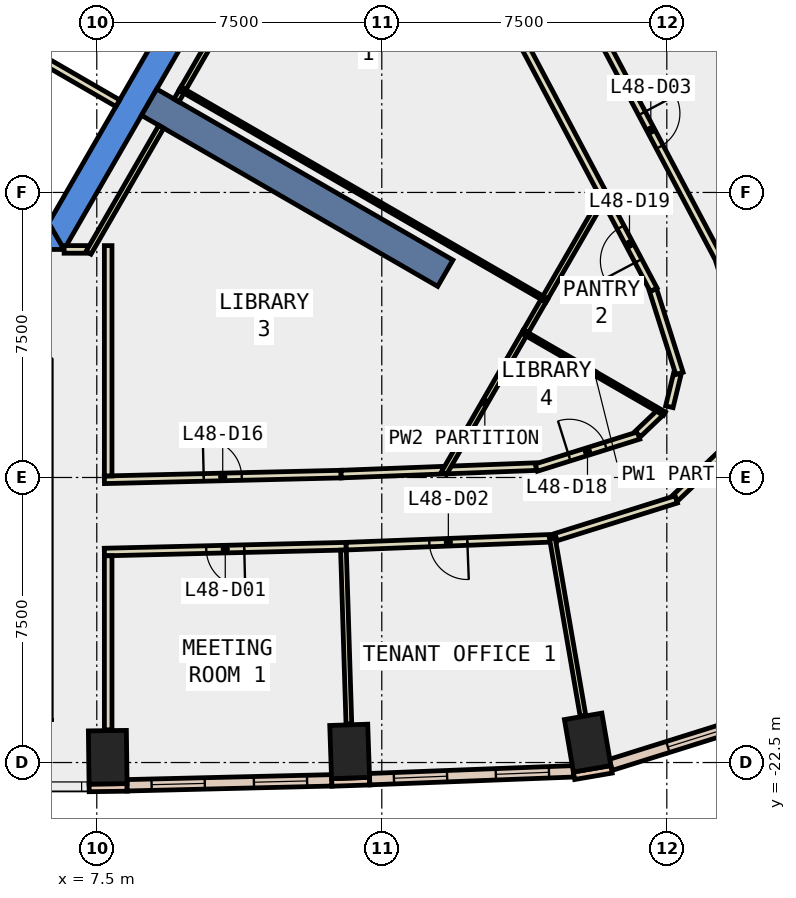
"""IFC4 building model, lengths in metres.
Left out: names, types, materials, properties, quantities, classifications, styles, units other than length and angle.
Written with IfcOpenShell. Run it as: python <this file> out.ifc"""

import sys

from ifc_helpers import new_model, si_unit, direction, frame, frame_2d, origin, origin_2d, place, context, subcontext, project, spatial, polyline, rectangle, outline, extrude, element, fill, save


model = new_model("IFC4")
c1 = context("Model", 3, precision=1e-05, world=origin(), true_north=direction((0.0, 1.0)))
c2 = subcontext(c1, "Body", "Model", "MODEL_VIEW")
j1 = project(units=[si_unit("LENGTHUNIT", "METRE"), si_unit("PLANEANGLEUNIT", "RADIAN")], contexts=[c1])
p1 = place(None, origin())
s1 = spatial("IfcSite", under=j1, at=p1, CompositionType="ELEMENT")
p2 = place(p1, origin())
s2 = spatial("IfcBuilding", under=s1, at=p2, CompositionType="ELEMENT")
p3 = place(p2, frame((0.0, 0.0, 215.0)))
s3 = spatial("IfcBuildingStorey", under=s2, at=p3, CompositionType="ELEMENT", Elevation=215.0)
for number, where, z_axis, x_axis in (
    (1, (7.788, -22.361, -0.4), (0.0, 0.0, 1.0), (1.0, 0.013, 0.0)),
    (2, (14.154, -22.208, -0.4), (0.0, 0.0, 1.0), (0.999, 0.034, 0.0)),
    (3, (20.417, -21.975, -0.4), (0.0, 0.0, 1.0), (0.986, 0.169, 0.0)),
):
    element("IfcColumn", number, at=place(p3, frame(where, z_axis=z_axis, x_axis=x_axis)), inside=s3, PredefinedType="COLUMN", context=c2, shape_type="SweptSolid", body=[
        extrude(rectangle(XDim=1.0, YDim=1.4, at=origin_2d()), origin(), (0.0, 0.0, 1.0), 4.2),
    ])
p4 = place(p3, frame((0.0, 0.0, -0.4)))
e4 = element("IfcWall", 4, at=p4, inside=s3, PredefinedType="SHEAR", context=c2, shape_type="SweptSolid", body=[
    extrude(outline(polyline([(5.75, -8.3), (5.75, -9.0), (6.64, -9.0), (6.235, -8.3), (5.75, -8.3)])), origin(), (0.0, 0.0, 1.0), 4.2),
])
p5 = place(p3, frame((0.0, 0.0, -0.4)))
e5 = element("IfcWall", 5, at=p5, inside=s3, PredefinedType="SHEAR", context=c2, shape_type="SweptSolid", body=[
    extrude(outline(polyline([(6.64, -9.0), (13.279, 2.5), (12.471, 2.5), (6.235, -8.3), (6.64, -9.0)])), origin(), (0.0, 0.0, 1.0), 4.2),
])
p6 = place(p3, frame((8.877, -5.125, -0.4), z_axis=(0.0, 0.0, 1.0), x_axis=(0.866017533419, -0.500013631625, 0.0)))
e6 = element("IfcWall", 6, at=p6, inside=s3, PredefinedType="SHEAR", context=c2, shape_type="SweptSolid", body=[
    extrude(rectangle(XDim=9.0, YDim=0.8, at=frame_2d((4.5, 0.0))), origin(), (0.0, 0.0, 1.0), 4.2),
])
p7 = place(p3, frame((7.299, -23.168, 0.0), z_axis=(0.0, 0.0, 1.0), x_axis=(0.999903186316, 0.013914668364, 0.0)))
e7 = element("IfcWall", 7, at=p7, inside=s3, PredefinedType="STANDARD", context=c2, shape_type="SweptSolid", body=[
    extrude(rectangle(XDim=1.0, YDim=0.2, at=frame_2d((0.5, 0.0))), origin(), (0.0, 0.0, 1.0), 3.8),
])
p8 = place(p3, frame((13.682, -23.024, 0.0), z_axis=(0.0, 0.0, 1.0), x_axis=(0.999423561854, 0.033949138587, 0.0)))
e8 = element("IfcWall", 8, at=p8, inside=s3, PredefinedType="STANDARD", context=c2, shape_type="SweptSolid", body=[
    extrude(rectangle(XDim=1.0, YDim=0.2, at=frame_2d((0.5, 0.0))), origin(), (0.0, 0.0, 1.0), 3.8),
])
p9 = place(p3, frame((20.059, -22.848, 0.0), z_axis=(0.0, 0.0, 1.0), x_axis=(0.985631544579, 0.168909615862, 0.0)))
e9 = element("IfcWall", 9, at=p9, inside=s3, PredefinedType="STANDARD", context=c2, shape_type="SweptSolid", body=[
    extrude(rectangle(XDim=1.0, YDim=0.2, at=frame_2d((0.5, 0.0))), origin(), (0.0, 0.0, 1.0), 3.8),
])
p10 = place(p3, frame((8.297, -23.099, 0.0), z_axis=(0.0, 0.0, 1.0), x_axis=(0.999708030006, 0.024163086341, 0.0)))
e10 = element("IfcWall", 10, at=p10, inside=s3, PredefinedType="STANDARD", context=c2, shape_type="SweptSolid", body=[
    extrude(rectangle(XDim=5.385, YDim=0.3, at=frame_2d((2.693, 0.0))), origin(), (0.0, 0.0, 1.0), 3.8),
])
p11 = place(p10, frame((0.646, 0.0, 0.9)))
e11 = element("IfcOpeningElement", 11, at=p11, cuts=e10, PredefinedType="OPENING", context=c2, shape_type="SweptSolid", body=[
    extrude(rectangle(XDim=1.4, YDim=2.6, at=frame_2d((0.7, 1.3))), frame((0.0, 0.16, 0.0), z_axis=(0.0, -1.0, 0.0), x_axis=(1.0, 0.0, 0.0)), (0.0, 0.0, 1.0), 0.32),
])
p12 = place(p10, frame((3.339, 0.0, 0.9)))
e12 = element("IfcOpeningElement", 12, at=p12, cuts=e10, PredefinedType="OPENING", context=c2, shape_type="SweptSolid", body=[
    extrude(rectangle(XDim=1.4, YDim=2.6, at=frame_2d((0.7, 1.3))), frame((0.0, 0.16, 0.0), z_axis=(0.0, -1.0, 0.0), x_axis=(1.0, 0.0, 0.0)), (0.0, 0.0, 1.0), 0.32),
])
p13 = place(p3, frame((14.679, -22.938, 0.0), z_axis=(0.0, 0.0, 1.0), x_axis=(0.99926218254, 0.038406907512, 0.0)))
e13 = element("IfcWall", 13, at=p13, inside=s3, PredefinedType="STANDARD", context=c2, shape_type="SweptSolid", body=[
    extrude(rectangle(XDim=5.365, YDim=0.3, at=frame_2d((2.683, 0.0))), origin(), (0.0, 0.0, 1.0), 3.8),
])
p14 = place(p13, frame((0.641, 0.0, 0.9)))
e14 = element("IfcOpeningElement", 14, at=p14, cuts=e13, PredefinedType="OPENING", context=c2, shape_type="SweptSolid", body=[
    extrude(rectangle(XDim=1.4, YDim=2.6, at=frame_2d((0.7, 1.3))), frame((0.0, 0.16, 0.0), z_axis=(0.0, -1.0, 0.0), x_axis=(1.0, 0.0, 0.0)), (0.0, 0.0, 1.0), 0.32),
])
p15 = place(p13, frame((3.324, 0.0, 0.9)))
e15 = element("IfcOpeningElement", 15, at=p15, cuts=e13, PredefinedType="OPENING", context=c2, shape_type="SweptSolid", body=[
    extrude(rectangle(XDim=1.4, YDim=2.6, at=frame_2d((0.7, 1.3))), frame((0.0, 0.16, 0.0), z_axis=(0.0, -1.0, 0.0), x_axis=(1.0, 0.0, 0.0)), (0.0, 0.0, 1.0), 0.32),
])
p16 = place(p3, frame((21.024, -22.562, 0.0), z_axis=(0.0, 0.0, 1.0), x_axis=(0.954297481837, 0.298858354675, 0.0)))
e16 = element("IfcWall", 16, at=p16, inside=s3, PredefinedType="STANDARD", context=c2, shape_type="SweptSolid", body=[
    extrude(rectangle(XDim=4.551, YDim=0.3, at=frame_2d((2.275, 0.0))), origin(), (0.0, 0.0, 1.0), 3.8),
])
p17 = place(p16, frame((1.575, 0.0, 0.9)))
e17 = element("IfcOpeningElement", 17, at=p17, cuts=e16, PredefinedType="OPENING", context=c2, shape_type="SweptSolid", body=[
    extrude(rectangle(XDim=1.4, YDim=2.6, at=frame_2d((0.7, 1.3))), frame((0.0, 0.16, 0.0), z_axis=(0.0, -1.0, 0.0), x_axis=(1.0, 0.0, 0.0)), (0.0, 0.0, 1.0), 0.32),
])
p18 = place(p3, frame((7.7, -15.061, 0.0), z_axis=(0.0, 0.0, 1.0), x_axis=(0.999709615165, 0.024097413707, 0.0)))
e18 = element("IfcWall", 18, at=p18, inside=s3, PredefinedType="PARTITIONING", context=c2, shape_type="SweptSolid", body=[
    extrude(rectangle(XDim=6.231, YDim=0.2, at=frame_2d((3.115, 0.0))), origin(), (0.0, 0.0, 1.0), 3.8),
])
p19 = place(p18, frame((2.615, 0.0, 0.0)))
e19 = element("IfcOpeningElement", 19, at=p19, cuts=e18, PredefinedType="OPENING", context=c2, shape_type="SweptSolid", body=[
    extrude(rectangle(XDim=1.0, YDim=2.1, at=frame_2d((0.5, 1.05))), frame((0.0, 0.11, 0.0), z_axis=(0.0, -1.0, 0.0), x_axis=(1.0, 0.0, 0.0)), (0.0, 0.0, 1.0), 0.22),
])
p20 = place(p3, frame((13.929, -14.911, 0.0), z_axis=(0.0, 0.0, 1.0), x_axis=(0.99926480204, 0.038338693307, 0.0)))
e20 = element("IfcWall", 20, at=p20, inside=s3, PredefinedType="PARTITIONING", context=c2, shape_type="SweptSolid", body=[
    extrude(rectangle(XDim=2.681, YDim=0.2, at=frame_2d((1.34, 0.0))), origin(), (0.0, 0.0, 1.0), 3.8),
])
p21 = place(p3, frame((20.882, -7.659, 0.0), z_axis=(0.0, 0.0, 1.0), x_axis=(-0.468206254133, 0.883619207346, 0.0)))
e21 = element("IfcWall", 21, at=p21, inside=s3, PredefinedType="PARTITIONING", context=c2, shape_type="SweptSolid", body=[
    extrude(rectangle(XDim=4.93, YDim=0.2, at=frame_2d((2.465, 0.0))), origin(), (0.0, 0.0, 1.0), 3.8),
])
p22 = place(p3, frame((16.757, -14.802, 0.0), z_axis=(0.0, 0.0, 1.0), x_axis=(0.999273784151, 0.038103862122, 0.0)))
e22 = element("IfcWall", 22, at=p22, inside=s3, PredefinedType="PARTITIONING", context=c2, shape_type="SweptSolid", body=[
    extrude(rectangle(XDim=2.307, YDim=0.2, at=frame_2d((1.153, 0.0))), origin(), (0.0, 0.0, 1.0), 3.8),
])
p23 = place(p3, frame((19.066, -14.74, 0.0), z_axis=(0.0, 0.0, 1.0), x_axis=(0.954238004552, 0.299048207935, 0.0)))
e23 = element("IfcWall", 23, at=p23, inside=s3, PredefinedType="PARTITIONING", context=c2, shape_type="SweptSolid", body=[
    extrude(rectangle(XDim=2.822, YDim=0.2, at=frame_2d((1.411, 0.0))), origin(), (0.0, 0.0, 1.0), 3.8),
])
p24 = place(p23, frame((0.911, 0.0, 0.0)))
e24 = element("IfcOpeningElement", 24, at=p24, cuts=e23, PredefinedType="OPENING", context=c2, shape_type="SweptSolid", body=[
    extrude(rectangle(XDim=1.0, YDim=2.1, at=frame_2d((0.5, 1.05))), frame((0.0, 0.11, 0.0), z_axis=(0.0, -1.0, 0.0), x_axis=(1.0, 0.0, 0.0)), (0.0, 0.0, 1.0), 0.22),
])
p25 = place(p3, frame((21.736, -13.857, 0.0), z_axis=(0.0, 0.0, 1.0), x_axis=(0.723666760573, 0.690149563241, 0.0)))
e25 = element("IfcWall", 25, at=p25, inside=s3, PredefinedType="PARTITIONING", context=c2, shape_type="SweptSolid", body=[
    extrude(rectangle(XDim=0.801, YDim=0.2, at=frame_2d((0.401, 0.0))), origin(), (0.0, 0.0, 1.0), 3.8),
])
p26 = place(p3, frame((22.567, -13.139, 0.0), z_axis=(0.0, 0.0, 1.0), x_axis=(0.2356388299, 0.971840697771, 0.0)))
e26 = element("IfcWall", 26, at=p26, inside=s3, PredefinedType="PARTITIONING", context=c2, shape_type="SweptSolid", body=[
    extrude(rectangle(XDim=0.9, YDim=0.2, at=frame_2d((0.45, 0.0))), origin(), (0.0, 0.0, 1.0), 3.8),
])
p27 = place(p3, frame((22.833, -12.262, 0.0), z_axis=(0.0, 0.0, 1.0), x_axis=(-0.302262657712, 0.953224677478, 0.0)))
e27 = element("IfcWall", 27, at=p27, inside=s3, PredefinedType="PARTITIONING", context=c2, shape_type="SweptSolid", body=[
    extrude(rectangle(XDim=2.303, YDim=0.2, at=frame_2d((1.151, 0.0))), origin(), (0.0, 0.0, 1.0), 3.8),
])
p28 = place(p3, frame((22.154, -10.06, 0.0), z_axis=(0.0, 0.0, 1.0), x_axis=(-0.468114756541, 0.883667683413, 0.0)))
e28 = element("IfcWall", 28, at=p28, inside=s3, PredefinedType="PARTITIONING", context=c2, shape_type="SweptSolid", body=[
    extrude(rectangle(XDim=2.717, YDim=0.2, at=frame_2d((1.359, 0.0))), origin(), (0.0, 0.0, 1.0), 3.8),
])
p29 = place(p28, frame((0.859, 0.0, 0.0)))
e29 = element("IfcOpeningElement", 29, at=p29, cuts=e28, PredefinedType="OPENING", context=c2, shape_type="SweptSolid", body=[
    extrude(rectangle(XDim=1.0, YDim=2.1, at=frame_2d((0.5, 1.05))), frame((0.0, 0.11, 0.0), z_axis=(0.0, -1.0, 0.0), x_axis=(1.0, 0.0, 0.0)), (0.0, 0.0, 1.0), 0.22),
])
p30 = place(p3, frame((14.063, -16.808, 0.0), z_axis=(0.0, 0.0, 1.0), x_axis=(-0.999707980382, -0.024165139379, 0.0)))
e30 = element("IfcWall", 30, at=p30, inside=s3, PredefinedType="PARTITIONING", context=c2, shape_type="SweptSolid", body=[
    extrude(rectangle(XDim=6.365, YDim=0.2, at=frame_2d((3.183, 0.0))), origin(), (0.0, 0.0, 1.0), 3.8),
])
p31 = place(p30, frame((2.683, 0.0, 0.0)))
e31 = element("IfcOpeningElement", 31, at=p31, cuts=e30, PredefinedType="OPENING", context=c2, shape_type="SweptSolid", body=[
    extrude(rectangle(XDim=1.0, YDim=2.1, at=frame_2d((0.5, 1.05))), frame((0.0, 0.11, 0.0), z_axis=(0.0, -1.0, 0.0), x_axis=(1.0, 0.0, 0.0)), (0.0, 0.0, 1.0), 0.22),
])
p32 = place(p3, frame((19.588, -16.595, 0.0), z_axis=(0.0, 0.0, 1.0), x_axis=(-0.999265212989, -0.038327980772, 0.0)))
e32 = element("IfcWall", 32, at=p32, inside=s3, PredefinedType="PARTITIONING", context=c2, shape_type="SweptSolid", body=[
    extrude(rectangle(XDim=5.529, YDim=0.2, at=frame_2d((2.765, 0.0))), origin(), (0.0, 0.0, 1.0), 3.8),
])
p33 = place(p32, frame((2.339, 0.0, 0.0)))
e33 = element("IfcOpeningElement", 33, at=p33, cuts=e32, PredefinedType="OPENING", context=c2, shape_type="SweptSolid", body=[
    extrude(rectangle(XDim=1.0, YDim=2.1, at=frame_2d((0.5, 1.05))), frame((0.0, 0.11, 0.0), z_axis=(0.0, -1.0, 0.0), x_axis=(1.0, 0.0, 0.0)), (0.0, 0.0, 1.0), 0.22),
])
p34 = place(p3, frame((20.245, -2.398, 0.0), z_axis=(0.0, 0.0, 1.0), x_axis=(0.468063775621, -0.883694688199, 0.0)))
e34 = element("IfcWall", 34, at=p34, inside=s3, PredefinedType="PARTITIONING", context=c2, shape_type="SweptSolid", body=[
    extrude(rectangle(XDim=7.836, YDim=0.2, at=frame_2d((3.918, 0.0))), origin(), (0.0, 0.0, 1.0), 3.8),
])
p35 = place(p34, frame((3.418, 0.0, 0.0)))
e35 = element("IfcOpeningElement", 35, at=p35, cuts=e34, PredefinedType="OPENING", context=c2, shape_type="SweptSolid", body=[
    extrude(rectangle(XDim=1.0, YDim=2.1, at=frame_2d((0.5, 1.05))), frame((0.0, 0.11, 0.0), z_axis=(0.0, -1.0, 0.0), x_axis=(1.0, 0.0, 0.0)), (0.0, 0.0, 1.0), 0.22),
])
p36 = place(p3, frame((23.897, -9.33, 0.0), z_axis=(0.0, 0.0, 1.0), x_axis=(0.302200639646, -0.953244340868, 0.0)))
e36 = element("IfcWall", 36, at=p36, inside=s3, PredefinedType="PARTITIONING", context=c2, shape_type="SweptSolid", body=[
    extrude(rectangle(XDim=3.004, YDim=0.2, at=frame_2d((1.502, 0.0))), origin(), (0.0, 0.0, 1.0), 3.8),
])
p37 = place(p3, frame((24.378, -13.964, 0.0), z_axis=(0.0, 0.0, 1.0), x_axis=(-0.723967420116, -0.689834164571, 0.0)))
e37 = element("IfcWall", 37, at=p37, inside=s3, PredefinedType="PARTITIONING", context=c2, shape_type="SweptSolid", body=[
    extrude(rectangle(XDim=2.282, YDim=0.2, at=frame_2d((1.141, 0.0))), origin(), (0.0, 0.0, 1.0), 3.8),
])
p38 = place(p3, frame((22.749, -15.577, 0.0), z_axis=(0.0, 0.0, 1.0), x_axis=(-0.954238750745, -0.299045826884, 0.0)))
e38 = element("IfcWall", 38, at=p38, inside=s3, PredefinedType="PARTITIONING", context=c2, shape_type="SweptSolid", body=[
    extrude(rectangle(XDim=3.318, YDim=0.2, at=frame_2d((1.659, 0.0))), origin(), (0.0, 0.0, 1.0), 3.8),
])
p39 = place(p3, frame((8.053, -5.152, 0.0), z_axis=(0.0, 0.0, 1.0), x_axis=(-0.865808344015, 0.500375770231, 0.0)))
e39 = element("IfcWall", 39, at=p39, inside=s3, PredefinedType="PARTITIONING", context=c2, shape_type="SweptSolid", body=[
    extrude(rectangle(XDim=2.9, YDim=0.2, at=frame_2d((1.45, 0.0))), origin(), (0.0, 0.0, 1.0), 3.8),
])
p40 = place(p3, frame((6.641, -8.999, 0.0), z_axis=(0.0, 0.0, 1.0), x_axis=(1.0, 0.0, 0.0)))
e40 = element("IfcWall", 40, at=p40, inside=s3, PredefinedType="PARTITIONING", context=c2, shape_type="SweptSolid", body=[
    extrude(rectangle(XDim=0.617, YDim=0.2, at=frame_2d((0.309, 0.0))), origin(), (0.0, 0.0, 1.0), 3.8),
])
p41 = place(p3, frame((7.283, -9.086, 0.0), z_axis=(0.0, 0.0, 1.0), x_axis=(0.500035303972, 0.866005020067, 0.0)))
e41 = element("IfcWall", 41, at=p41, inside=s3, PredefinedType="PARTITIONING", context=c2, shape_type="SweptSolid", body=[
    extrude(rectangle(XDim=3.828, YDim=0.15, at=frame_2d((1.914, 0.0))), origin(), (0.0, 0.0, 1.0), 3.8),
])
p42 = place(p3, frame((9.779, -4.762, 0.0), z_axis=(0.0, 0.0, 1.0), x_axis=(0.499990552429, 0.866030858274, 0.0)))
e42 = element("IfcWall", 42, at=p42, inside=s3, PredefinedType="PARTITIONING", context=c2, shape_type="SweptSolid", body=[
    extrude(rectangle(XDim=9.906, YDim=0.15, at=frame_2d((4.953, 0.0))), origin(), (0.0, 0.0, 1.0), 3.8),
])
p43 = place(p3, frame((7.8, -8.899, 0.0), z_axis=(0.0, 0.0, 1.0), x_axis=(0.0, -1.0, 0.0)))
e43 = element("IfcWall", 43, at=p43, inside=s3, PredefinedType="PARTITIONING", context=c2, shape_type="SweptSolid", body=[
    extrude(rectangle(XDim=6.06, YDim=0.2, at=frame_2d((3.03, 0.0))), origin(), (0.0, 0.0, 1.0), 3.8),
])
p44 = place(p3, frame((7.8, -17.059, 0.0), z_axis=(0.0, 0.0, 1.0), x_axis=(0.0, -1.0, 0.0)))
e44 = element("IfcWall", 44, at=p44, inside=s3, PredefinedType="PARTITIONING", context=c2, shape_type="SweptSolid", body=[
    extrude(rectangle(XDim=4.582, YDim=0.2, at=frame_2d((2.291, 0.0))), origin(), (0.0, 0.0, 1.0), 3.8),
])
p45 = place(p3, frame((9.689, -4.768, 0.0), z_axis=(0.0, 0.0, 1.0), x_axis=(0.866023322577, -0.500003604739, 0.0)))
e45 = element("IfcWall", 45, at=p45, inside=s3, PredefinedType="PARTITIONING", context=c2, shape_type="SweptSolid", body=[
    extrude(rectangle(XDim=11.15, YDim=0.1, at=frame_2d((5.575, 0.0))), origin(), (0.0, 0.0, 1.0), 3.8),
])
p46 = place(p3, frame((18.789, -11.156, 0.0), z_axis=(0.0, 0.0, 1.0), x_axis=(-0.499822078765, -0.866128102292, 0.0)))
e46 = element("IfcWall", 46, at=p46, inside=s3, PredefinedType="PARTITIONING", context=c2, shape_type="SweptSolid", body=[
    extrude(rectangle(XDim=4.313, YDim=0.15, at=frame_2d((2.157, 0.0))), origin(), (0.0, 0.0, 1.0), 3.8),
])
p47 = place(p3, frame((19.255, -10.349, 0.0), z_axis=(0.0, 0.0, 1.0), x_axis=(-0.499185199876, -0.866495318063, 0.0)))
e47 = element("IfcWall", 47, at=p47, inside=s3, PredefinedType="PARTITIONING", context=c2, shape_type="SweptSolid", body=[
    extrude(rectangle(XDim=0.931, YDim=0.15, at=frame_2d((0.466, 0.0))), origin(), (0.0, 0.0, 1.0), 3.8),
])
p48 = place(p3, frame((20.847, -7.593, 0.0), z_axis=(0.0, 0.0, 1.0), x_axis=(-0.500261762561, -0.865874222343, 0.0)))
e48 = element("IfcWall", 48, at=p48, inside=s3, PredefinedType="PARTITIONING", context=c2, shape_type="SweptSolid", body=[
    extrude(rectangle(XDim=3.082, YDim=0.15, at=frame_2d((1.541, 0.0))), origin(), (0.0, 0.0, 1.0), 3.8),
])
p49 = place(p3, frame((18.765, -11.199, 0.0), z_axis=(0.0, 0.0, 1.0), x_axis=(0.866038964406, -0.499976511579, 0.0)))
e49 = element("IfcWall", 49, at=p49, inside=s3, PredefinedType="PARTITIONING", context=c2, shape_type="SweptSolid", body=[
    extrude(rectangle(XDim=4.242, YDim=0.1, at=frame_2d((2.121, 0.0))), origin(), (0.0, 0.0, 1.0), 3.8),
])
p50 = place(p3, frame((13.991, -16.91, 0.0), z_axis=(0.0, 0.0, 1.0), x_axis=(0.031234752378, -0.999512076087, 0.0)))
e50 = element("IfcWall", 50, at=p50, inside=s3, PredefinedType="PARTITIONING", context=c2, shape_type="SweptSolid", body=[
    extrude(rectangle(XDim=4.58, YDim=0.15, at=frame_2d((2.29, 0.0))), origin(), (0.0, 0.0, 1.0), 3.8),
])
p51 = place(p3, frame((19.488, -16.599, 0.0), z_axis=(0.0, 0.0, 1.0), x_axis=(0.169963884325, -0.985450292011, 0.0)))
e51 = element("IfcWall", 51, at=p51, inside=s3, PredefinedType="PARTITIONING", context=c2, shape_type="SweptSolid", body=[
    extrude(rectangle(XDim=4.736, YDim=0.15, at=frame_2d((2.368, 0.0))), origin(), (0.0, 0.0, 1.0), 3.8),
])
p52 = place(p3, frame((9.596, -5.079, 0.0), z_axis=(0.0, 0.0, 1.0), x_axis=(0.500782702656, 0.865573038351, 0.0)))
e52 = element("IfcWall", 52, at=p52, inside=s3, PredefinedType="PARTITIONING", context=c2, shape_type="SweptSolid", body=[
    extrude(rectangle(XDim=0.266, YDim=0.15, at=frame_2d((0.133, 0.0))), origin(), (0.0, 0.0, 1.0), 3.8),
])
p53 = place(p3, frame((5.492, -3.788, 0.0), z_axis=(0.0, 0.0, 1.0), x_axis=(0.500034260056, 0.866005622828, 0.0)))
e53 = element("IfcWall", 53, at=p53, inside=s3, PredefinedType="STANDARD", context=c2, shape_type="SweptSolid", body=[
    extrude(rectangle(XDim=5.399, YDim=0.2, at=frame_2d((2.7, 0.0))), origin(), (0.0, 0.0, 1.0), 3.8),
])
p54 = place(p11, origin())
e54 = element("IfcWindow", 54, at=p54, inside=s3, PartitioningType="SINGLE_PANEL", PredefinedType="WINDOW", context=c2, shape_type="SweptSolid", body=[
    extrude(rectangle(XDim=1.4, YDim=2.6, at=frame_2d((0.7, 1.3))), frame((0.0, 0.03, 0.0), z_axis=(0.0, -1.0, 0.0), x_axis=(1.0, 0.0, 0.0)), (0.0, 0.0, 1.0), 0.06),
])
fill(e11, e54)
p55 = place(p12, origin())
e55 = element("IfcWindow", 55, at=p55, inside=s3, PartitioningType="SINGLE_PANEL", PredefinedType="WINDOW", context=c2, shape_type="SweptSolid", body=[
    extrude(rectangle(XDim=1.4, YDim=2.6, at=frame_2d((0.7, 1.3))), frame((0.0, 0.03, 0.0), z_axis=(0.0, -1.0, 0.0), x_axis=(1.0, 0.0, 0.0)), (0.0, 0.0, 1.0), 0.06),
])
fill(e12, e55)
p56 = place(p14, origin())
e56 = element("IfcWindow", 56, at=p56, inside=s3, PartitioningType="SINGLE_PANEL", PredefinedType="WINDOW", context=c2, shape_type="SweptSolid", body=[
    extrude(rectangle(XDim=1.4, YDim=2.6, at=frame_2d((0.7, 1.3))), frame((0.0, 0.03, 0.0), z_axis=(0.0, -1.0, 0.0), x_axis=(1.0, 0.0, 0.0)), (0.0, 0.0, 1.0), 0.06),
])
fill(e14, e56)
p57 = place(p15, origin())
e57 = element("IfcWindow", 57, at=p57, inside=s3, PartitioningType="SINGLE_PANEL", PredefinedType="WINDOW", context=c2, shape_type="SweptSolid", body=[
    extrude(rectangle(XDim=1.4, YDim=2.6, at=frame_2d((0.7, 1.3))), frame((0.0, 0.03, 0.0), z_axis=(0.0, -1.0, 0.0), x_axis=(1.0, 0.0, 0.0)), (0.0, 0.0, 1.0), 0.06),
])
fill(e15, e57)
p58 = place(p17, origin())
e58 = element("IfcWindow", 58, at=p58, inside=s3, PartitioningType="SINGLE_PANEL", PredefinedType="WINDOW", context=c2, shape_type="SweptSolid", body=[
    extrude(rectangle(XDim=1.4, YDim=2.6, at=frame_2d((0.7, 1.3))), frame((0.0, 0.03, 0.0), z_axis=(0.0, -1.0, 0.0), x_axis=(1.0, 0.0, 0.0)), (0.0, 0.0, 1.0), 0.06),
])
fill(e17, e58)
p59 = place(p31, origin())
e59 = element("IfcDoor", 59, at=p59, inside=s3, OperationType="SINGLE_SWING_LEFT", PredefinedType="DOOR", context=c2, shape_type="SweptSolid", body=[
    extrude(rectangle(XDim=1.0, YDim=2.1, at=frame_2d((0.5, 1.05))), frame((0.0, 0.025, 0.0), z_axis=(0.0, -1.0, 0.0), x_axis=(1.0, 0.0, 0.0)), (0.0, 0.0, 1.0), 0.05),
])
fill(e31, e59)
p60 = place(p33, origin())
e60 = element("IfcDoor", 60, at=p60, inside=s3, OperationType="SINGLE_SWING_LEFT", PredefinedType="DOOR", context=c2, shape_type="SweptSolid", body=[
    extrude(rectangle(XDim=1.0, YDim=2.1, at=frame_2d((0.5, 1.05))), frame((0.0, 0.025, 0.0), z_axis=(0.0, -1.0, 0.0), x_axis=(1.0, 0.0, 0.0)), (0.0, 0.0, 1.0), 0.05),
])
fill(e33, e60)
p61 = place(p35, origin())
e61 = element("IfcDoor", 61, at=p61, inside=s3, OperationType="SINGLE_SWING_LEFT", PredefinedType="DOOR", context=c2, shape_type="SweptSolid", body=[
    extrude(rectangle(XDim=1.0, YDim=2.1, at=frame_2d((0.5, 1.05))), frame((0.0, 0.025, 0.0), z_axis=(0.0, -1.0, 0.0), x_axis=(1.0, 0.0, 0.0)), (0.0, 0.0, 1.0), 0.05),
])
fill(e35, e61)
p62 = place(p19, origin())
e62 = element("IfcDoor", 62, at=p62, inside=s3, OperationType="SINGLE_SWING_LEFT", PredefinedType="DOOR", context=c2, shape_type="SweptSolid", body=[
    extrude(rectangle(XDim=1.0, YDim=2.1, at=frame_2d((0.5, 1.05))), frame((0.0, 0.025, 0.0), z_axis=(0.0, -1.0, 0.0), x_axis=(1.0, 0.0, 0.0)), (0.0, 0.0, 1.0), 0.05),
])
fill(e19, e62)
p63 = place(p24, origin())
e63 = element("IfcDoor", 63, at=p63, inside=s3, OperationType="SINGLE_SWING_LEFT", PredefinedType="DOOR", context=c2, shape_type="SweptSolid", body=[
    extrude(rectangle(XDim=1.0, YDim=2.1, at=frame_2d((0.5, 1.05))), frame((0.0, 0.025, 0.0), z_axis=(0.0, -1.0, 0.0), x_axis=(1.0, 0.0, 0.0)), (0.0, 0.0, 1.0), 0.05),
])
fill(e24, e63)
p64 = place(p29, origin())
e64 = element("IfcDoor", 64, at=p64, inside=s3, OperationType="SINGLE_SWING_LEFT", PredefinedType="DOOR", context=c2, shape_type="SweptSolid", body=[
    extrude(rectangle(XDim=1.0, YDim=2.1, at=frame_2d((0.5, 1.05))), frame((0.0, 0.025, 0.0), z_axis=(0.0, -1.0, 0.0), x_axis=(1.0, 0.0, 0.0)), (0.0, 0.0, 1.0), 0.05),
])
fill(e29, e64)
save(model, sys.argv[1])
